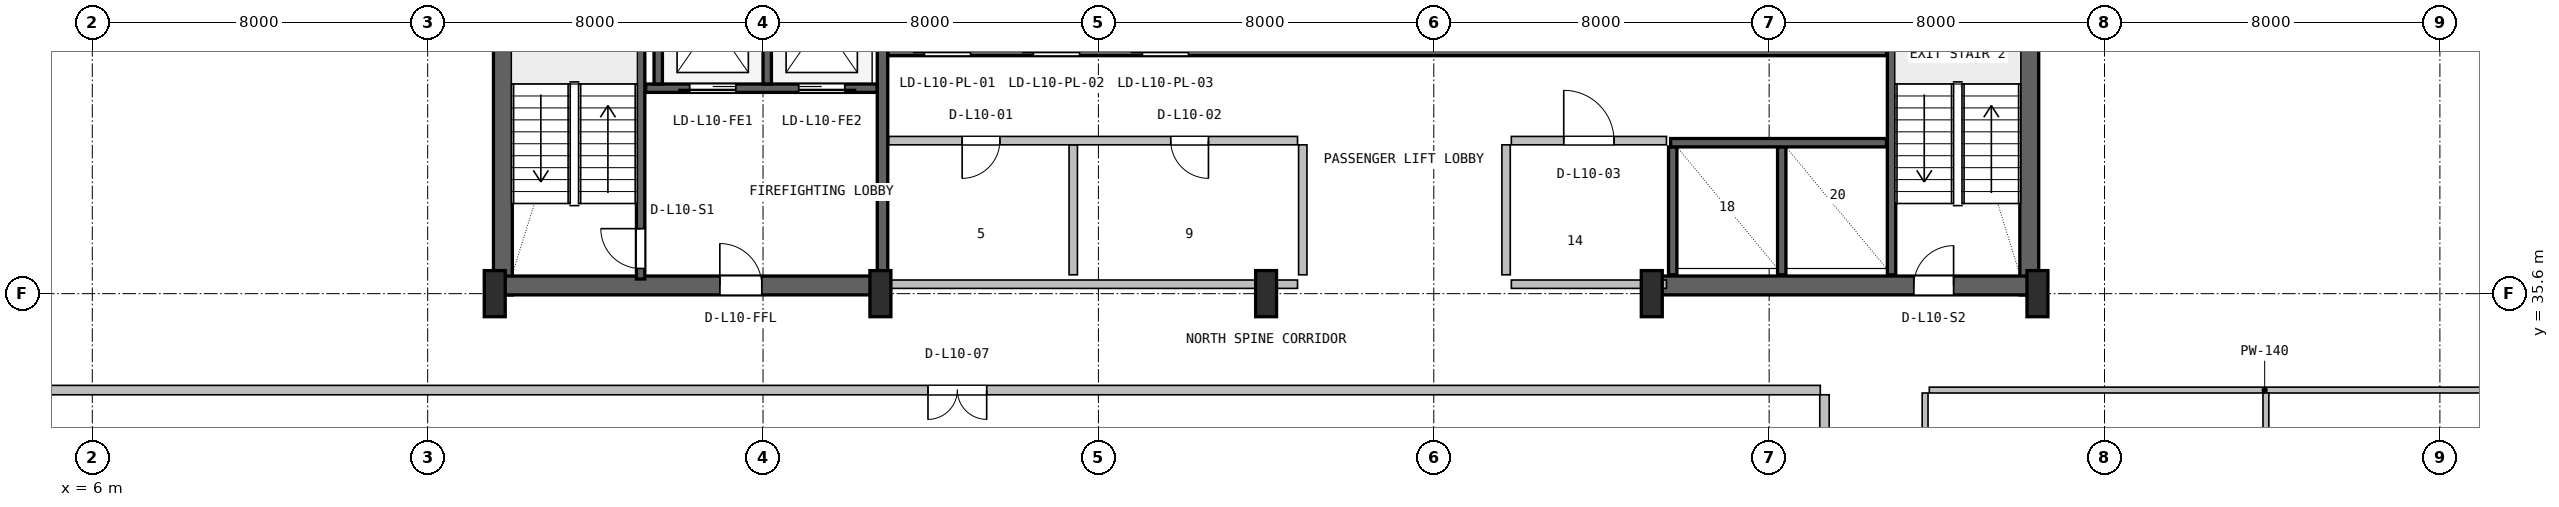
"""IFC4 building model, lengths in metres.
Left out: names, types, materials, properties, quantities, classifications, styles, units other than length and angle.
Written with IfcOpenShell. Run it as: python <this file> out.ifc"""

import sys

from ifc_helpers import new_model, si_unit, direction, frame, frame_2d, origin, origin_2d, place, context, subcontext, project, spatial, rectangle, i_section, extrude, source, transform, mapped, element, fill, save


model = new_model("IFC4")
c1 = context("Model", 3, precision=1e-05, world=origin(), true_north=direction((0.0, 1.0)))
c2 = subcontext(c1, "Body", "Model", "MODEL_VIEW")
j1 = project(units=[si_unit("LENGTHUNIT", "METRE"), si_unit("PLANEANGLEUNIT", "RADIAN")], contexts=[c1])
p1 = place(None, origin())
s1 = spatial("IfcSite", under=j1, at=p1, CompositionType="ELEMENT")
p2 = place(p1, origin())
s2 = spatial("IfcBuilding", under=s1, at=p2, CompositionType="ELEMENT")
p3 = place(p2, frame((0.0, 0.0, 47.1)))
s3 = spatial("IfcBuildingStorey", under=s2, at=p3, CompositionType="ELEMENT", Elevation=47.1)
for number, where, z_axis, x_axis in (
    (1, (15.795, 35.57, 0.0), (0.0, 0.0, 1.0), (0.0, 1.0, 0.0)),
    (2, (52.205, 35.57, 0.0), (0.0, 0.0, 1.0), (0.0, 1.0, 0.0)),
):
    element("IfcWall", number, at=place(p3, frame(where, z_axis=z_axis, x_axis=x_axis)), inside=s3, PredefinedType="SHEAR", context=c2, shape_type="SweptSolid", body=[
        extrude(rectangle(XDim=11.23, YDim=0.45, at=frame_2d((5.615, 0.0))), origin(), (0.0, 0.0, 1.0), 3.65),
    ])
p4 = place(p3, frame((15.57, 35.795, 0.0), z_axis=(0.0, 0.0, 1.0), x_axis=(1.0, 0.0, 0.0)))
e3 = element("IfcWall", 3, at=p4, inside=s3, PredefinedType="SHEAR", context=c2, shape_type="SweptSolid", body=[
    extrude(rectangle(XDim=9.23, YDim=0.45, at=frame_2d((4.615, 0.0))), origin(), (0.0, 0.0, 1.0), 3.65),
])
p5 = place(p4, frame((5.4, 0.0, 0.0)))
e4 = element("IfcOpeningElement", 4, at=p5, cuts=e3, PredefinedType="OPENING", context=c2, shape_type="SweptSolid", body=[
    extrude(rectangle(XDim=1.0, YDim=2.1, at=frame_2d((0.5, 1.05))), frame((0.0, 0.235, 0.0), z_axis=(0.0, -1.0, 0.0), x_axis=(1.0, 0.0, 0.0)), (0.0, 0.0, 1.0), 0.47),
])
p6 = place(p3, frame((43.2, 35.795, 0.0), z_axis=(0.0, 0.0, 1.0), x_axis=(1.0, 0.0, 0.0)))
e5 = element("IfcWall", 5, at=p6, inside=s3, PredefinedType="SHEAR", context=c2, shape_type="SweptSolid", body=[
    extrude(rectangle(XDim=9.23, YDim=0.45, at=frame_2d((4.615, 0.0))), origin(), (0.0, 0.0, 1.0), 3.65),
])
p7 = place(p6, frame((6.25, 0.0, 0.0)))
e6 = element("IfcOpeningElement", 6, at=p7, cuts=e5, PredefinedType="OPENING", context=c2, shape_type="SweptSolid", body=[
    extrude(rectangle(XDim=0.95, YDim=2.1, at=frame_2d((0.475, 1.05))), frame((0.0, 0.235, 0.0), z_axis=(0.0, -1.0, 0.0), x_axis=(1.0, 0.0, 0.0)), (0.0, 0.0, 1.0), 0.47),
])
m1 = source(origin(), c2, "Body", "SweptSolid", [
    extrude(i_section(OverallWidth=0.5, OverallDepth=1.1, WebThickness=0.018, FlangeThickness=0.032, FilletRadius=0.018, at=origin_2d()), origin(), (0.0, 0.0, 1.0), 3.9),
])
for number, where, z_axis, x_axis in (
    (7, (15.6, 35.6, 0.0), (0.0, 0.0, 1.0), (1.0, 0.0, 0.0)),
    (8, (24.8, 35.6, 0.0), (0.0, 0.0, 1.0), (1.0, 0.0, 0.0)),
    (9, (34.0, 35.6, 0.0), (0.0, 0.0, 1.0), (1.0, 0.0, 0.0)),
    (10, (43.2, 35.6, 0.0), (0.0, 0.0, 1.0), (1.0, 0.0, 0.0)),
    (11, (52.4, 35.6, 0.0), (0.0, 0.0, 1.0), (1.0, 0.0, 0.0)),
):
    element("IfcColumn", number, at=place(p3, frame(where, z_axis=z_axis, x_axis=x_axis)), inside=s3, PredefinedType="COLUMN", context=c2, shape_type="MappedRepresentation", body=[
        mapped(m1, transform((0.0, 0.0, 0.0), x_axis=(1.0, 0.0, 0.0), y_axis=(0.0, 1.0, 0.0), z_axis=(0.0, 0.0, 1.0), scale=1.0)),
    ])
p8 = place(p3, frame((19.08, 35.95, 0.0), z_axis=(0.0, 0.0, 1.0), x_axis=(0.0, 1.0, 0.0)))
e12 = element("IfcWall", 12, at=p8, inside=s3, PredefinedType="SHEAR", context=c2, shape_type="SweptSolid", body=[
    extrude(rectangle(XDim=9.65, YDim=0.2, at=frame_2d((4.825, 0.0))), origin(), (0.0, 0.0, 1.0), 3.65),
])
p9 = place(p8, frame((0.25, 0.0, 0.0)))
e13 = element("IfcOpeningElement", 13, at=p9, cuts=e12, PredefinedType="OPENING", context=c2, shape_type="SweptSolid", body=[
    extrude(rectangle(XDim=0.95, YDim=2.1, at=frame_2d((0.475, 1.05))), frame((0.0, 0.11, 0.0), z_axis=(0.0, -1.0, 0.0), x_axis=(1.0, 0.0, 0.0)), (0.0, 0.0, 1.0), 0.22),
])
p10 = place(p3, frame((24.85, 36.05, 0.0), z_axis=(0.0, 0.0, 1.0), x_axis=(0.0, 1.0, 0.0)))
e14 = element("IfcWall", 14, at=p10, inside=s3, PredefinedType="SHEAR", context=c2, shape_type="SweptSolid", body=[
    extrude(rectangle(XDim=10.45, YDim=0.25, at=frame_2d((5.225, 0.0))), origin(), (0.0, 0.0, 1.0), 3.65),
])
p11 = place(p3, frame((19.2, 40.5, 0.0), z_axis=(0.0, 0.0, 1.0), x_axis=(1.0, 0.0, 0.0)))
e15 = element("IfcWall", 15, at=p11, inside=s3, PredefinedType="SHEAR", context=c2, shape_type="SweptSolid", body=[
    extrude(rectangle(XDim=5.52, YDim=0.2, at=frame_2d((2.76, 0.0))), origin(), (0.0, 0.0, 1.0), 3.65),
])
p12 = place(p11, frame((1.05, 0.0, 0.0)))
e16 = element("IfcOpeningElement", 16, at=p12, cuts=e15, PredefinedType="OPENING", context=c2, shape_type="SweptSolid", body=[
    extrude(rectangle(XDim=1.1, YDim=2.18, at=frame_2d((0.55, 1.09))), frame((0.0, 0.11, 0.0), z_axis=(0.0, -1.0, 0.0), x_axis=(1.0, 0.0, 0.0)), (0.0, 0.0, 1.0), 0.22),
])
p13 = place(p11, frame((3.65, 0.0, 0.0)))
e17 = element("IfcOpeningElement", 17, at=p13, cuts=e15, PredefinedType="OPENING", context=c2, shape_type="SweptSolid", body=[
    extrude(rectangle(XDim=1.1, YDim=2.18, at=frame_2d((0.55, 1.09))), frame((0.0, 0.11, 0.0), z_axis=(0.0, -1.0, 0.0), x_axis=(1.0, 0.0, 0.0)), (0.0, 0.0, 1.0), 0.22),
])
p14 = place(p3, frame((22.1, 40.6, 0.0), z_axis=(0.0, 0.0, 1.0), x_axis=(0.0, 1.0, 0.0)))
e18 = element("IfcWall", 18, at=p14, inside=s3, PredefinedType="SHEAR", context=c2, shape_type="SweptSolid", body=[
    extrude(rectangle(XDim=3.0, YDim=0.2, at=frame_2d((1.5, 0.0))), origin(), (0.0, 0.0, 1.0), 3.65),
])
p15 = place(p3, frame((19.5, 40.6, 0.0), z_axis=(0.0, 0.0, 1.0), x_axis=(0.0, 1.0, 0.0)))
e19 = element("IfcWall", 19, at=p15, inside=s3, PredefinedType="SHEAR", context=c2, shape_type="SweptSolid", body=[
    extrude(rectangle(XDim=5.95, YDim=0.2, at=frame_2d((2.975, 0.0))), origin(), (0.0, 0.0, 1.0), 3.65),
])
p16 = place(p3, frame((48.92, 36.05, 0.0), z_axis=(0.0, 0.0, 1.0), x_axis=(0.0, 1.0, 0.0)))
e20 = element("IfcWall", 20, at=p16, inside=s3, PredefinedType="SHEAR", context=c2, shape_type="SweptSolid", body=[
    extrude(rectangle(XDim=10.5, YDim=0.2, at=frame_2d((5.25, 0.0))), origin(), (0.0, 0.0, 1.0), 3.65),
])
p17 = place(p3, frame((24.98, 41.4, 0.0), z_axis=(0.0, 0.0, 1.0), x_axis=(1.0, 0.0, 0.0)))
e21 = element("IfcWall", 21, at=p17, inside=s3, PredefinedType="SHEAR", context=c2, shape_type="SweptSolid", body=[
    extrude(rectangle(XDim=23.82, YDim=0.25, at=frame_2d((11.91, 0.0))), origin(), (0.0, 0.0, 1.0), 3.65),
])
p18 = place(p17, frame((0.87, 0.0, 0.0)))
e22 = element("IfcOpeningElement", 22, at=p18, cuts=e21, PredefinedType="OPENING", context=c2, shape_type="SweptSolid", body=[
    extrude(rectangle(XDim=1.1, YDim=2.18, at=frame_2d((0.55, 1.09))), frame((0.0, 0.135, 0.0), z_axis=(0.0, -1.0, 0.0), x_axis=(1.0, 0.0, 0.0)), (0.0, 0.0, 1.0), 0.27),
])
p19 = place(p17, frame((3.47, 0.0, 0.0)))
e23 = element("IfcOpeningElement", 23, at=p19, cuts=e21, PredefinedType="OPENING", context=c2, shape_type="SweptSolid", body=[
    extrude(rectangle(XDim=1.1, YDim=2.18, at=frame_2d((0.55, 1.09))), frame((0.0, 0.135, 0.0), z_axis=(0.0, -1.0, 0.0), x_axis=(1.0, 0.0, 0.0)), (0.0, 0.0, 1.0), 0.27),
])
p20 = place(p17, frame((6.07, 0.0, 0.0)))
e24 = element("IfcOpeningElement", 24, at=p20, cuts=e21, PredefinedType="OPENING", context=c2, shape_type="SweptSolid", body=[
    extrude(rectangle(XDim=1.1, YDim=2.18, at=frame_2d((0.55, 1.09))), frame((0.0, 0.135, 0.0), z_axis=(0.0, -1.0, 0.0), x_axis=(1.0, 0.0, 0.0)), (0.0, 0.0, 1.0), 0.27),
])
for number, where, z_axis, x_axis in (
    (25, (43.7, 36.05, 0.0), (0.0, 0.0, 1.0), (0.0, 1.0, 0.0)),
    (26, (46.3, 36.05, 0.0), (0.0, 0.0, 1.0), (0.0, 1.0, 0.0)),
):
    element("IfcWall", number, at=place(p3, frame(where, z_axis=z_axis, x_axis=x_axis)), inside=s3, PredefinedType="SHEAR", context=c2, shape_type="SweptSolid", body=[
        extrude(rectangle(XDim=3.05, YDim=0.2, at=frame_2d((1.525, 0.0))), origin(), (0.0, 0.0, 1.0), 3.65),
    ])
p21 = place(p3, frame((43.65, 39.2, 0.0), z_axis=(0.0, 0.0, 1.0), x_axis=(1.0, 0.0, 0.0)))
e27 = element("IfcWall", 27, at=p21, inside=s3, PredefinedType="SHEAR", context=c2, shape_type="SweptSolid", body=[
    extrude(rectangle(XDim=5.15, YDim=0.2, at=frame_2d((2.575, 0.0))), origin(), (0.0, 0.0, 1.0), 3.65),
])
p22 = place(p3, frame((25.0, 35.825, 0.0), z_axis=(0.0, 0.0, 1.0), x_axis=(1.0, 0.0, 0.0)))
e28 = element("IfcWall", 28, at=p22, inside=s3, PredefinedType="PLUMBINGWALL", context=c2, shape_type="SweptSolid", body=[
    extrude(rectangle(XDim=9.75, YDim=0.2, at=frame_2d((4.875, 0.0))), origin(), (0.0, 0.0, 1.0), 2.425),
])
p23 = place(p3, frame((29.4, 36.05, 0.0), z_axis=(0.0, 0.0, 1.0), x_axis=(0.0, 1.0, 0.0)))
e29 = element("IfcWall", 29, at=p23, inside=s3, PredefinedType="PLUMBINGWALL", context=c2, shape_type="SweptSolid", body=[
    extrude(rectangle(XDim=3.1, YDim=0.2, at=frame_2d((1.55, 0.0))), origin(), (0.0, 0.0, 1.0), 3.63),
])
p24 = place(p3, frame((25.0, 39.25, 0.0), z_axis=(0.0, 0.0, 1.0), x_axis=(1.0, 0.0, 0.0)))
e30 = element("IfcWall", 30, at=p24, inside=s3, PredefinedType="PLUMBINGWALL", context=c2, shape_type="SweptSolid", body=[
    extrude(rectangle(XDim=9.75, YDim=0.2, at=frame_2d((4.875, 0.0))), origin(), (0.0, 0.0, 1.0), 3.63),
])
p25 = place(p24, frame((1.75, 0.0, 0.0)))
e31 = element("IfcOpeningElement", 31, at=p25, cuts=e30, PredefinedType="OPENING", context=c2, shape_type="SweptSolid", body=[
    extrude(rectangle(XDim=0.9, YDim=2.06, at=frame_2d((0.45, 1.03))), frame((0.0, 0.11, 0.0), z_axis=(0.0, -1.0, 0.0), x_axis=(1.0, 0.0, 0.0)), (0.0, 0.0, 1.0), 0.22),
])
p26 = place(p24, frame((6.725, 0.0, 0.0)))
e32 = element("IfcOpeningElement", 32, at=p26, cuts=e30, PredefinedType="OPENING", context=c2, shape_type="SweptSolid", body=[
    extrude(rectangle(XDim=0.9, YDim=2.06, at=frame_2d((0.45, 1.03))), frame((0.0, 0.11, 0.0), z_axis=(0.0, -1.0, 0.0), x_axis=(1.0, 0.0, 0.0)), (0.0, 0.0, 1.0), 0.22),
])
p27 = place(p3, frame((34.875, 36.05, 0.0), z_axis=(0.0, 0.0, 1.0), x_axis=(0.0, 1.0, 0.0)))
e33 = element("IfcWall", 33, at=p27, inside=s3, PredefinedType="PLUMBINGWALL", context=c2, shape_type="SweptSolid", body=[
    extrude(rectangle(XDim=3.1, YDim=0.2, at=frame_2d((1.55, 0.0))), origin(), (0.0, 0.0, 1.0), 3.63),
])
p28 = place(p3, frame((39.85, 35.825, 0.0), z_axis=(0.0, 0.0, 1.0), x_axis=(1.0, 0.0, 0.0)))
e34 = element("IfcWall", 34, at=p28, inside=s3, PredefinedType="SOLIDWALL", context=c2, shape_type="SweptSolid", body=[
    extrude(rectangle(XDim=3.7, YDim=0.2, at=frame_2d((1.85, 0.0))), origin(), (0.0, 0.0, 1.0), 2.425),
])
p29 = place(p3, frame((39.85, 39.25, 0.0), z_axis=(0.0, 0.0, 1.0), x_axis=(1.0, 0.0, 0.0)))
e35 = element("IfcWall", 35, at=p29, inside=s3, PredefinedType="SOLIDWALL", context=c2, shape_type="SweptSolid", body=[
    extrude(rectangle(XDim=3.7, YDim=0.2, at=frame_2d((1.85, 0.0))), origin(), (0.0, 0.0, 1.0), 3.63),
])
p30 = place(p29, frame((1.25, 0.0, 0.0)))
e36 = element("IfcOpeningElement", 36, at=p30, cuts=e35, PredefinedType="OPENING", context=c2, shape_type="SweptSolid", body=[
    extrude(rectangle(XDim=1.2, YDim=2.1, at=frame_2d((0.6, 1.05))), frame((0.0, 0.11, 0.0), z_axis=(0.0, -1.0, 0.0), x_axis=(1.0, 0.0, 0.0)), (0.0, 0.0, 1.0), 0.22),
])
p31 = place(p3, frame((39.725, 36.05, 0.0), z_axis=(0.0, 0.0, 1.0), x_axis=(0.0, 1.0, 0.0)))
e37 = element("IfcWall", 37, at=p31, inside=s3, PredefinedType="SOLIDWALL", context=c2, shape_type="SweptSolid", body=[
    extrude(rectangle(XDim=3.1, YDim=0.2, at=frame_2d((1.55, 0.0))), origin(), (0.0, 0.0, 1.0), 3.63),
])
p32 = place(p3, frame((47.32, 13.203, 0.0), z_axis=(0.0, 0.0, 1.0), x_axis=(0.0, 1.0, 0.0)))
e38 = element("IfcWall", 38, at=p32, inside=s3, PredefinedType="PARTITIONING", context=c2, shape_type="SweptSolid", body=[
    extrude(rectangle(XDim=19.985, YDim=0.225, at=frame_2d((9.993, 0.0))), origin(), (0.0, 0.0, 1.0), 3.322),
])
p33 = place(p3, frame((2.18, 33.3, 0.0), z_axis=(0.0, 0.0, 1.0), x_axis=(1.0, 0.0, 0.0)))
e39 = element("IfcWall", 39, at=p33, inside=s3, PredefinedType="PARTITIONING", context=c2, shape_type="SweptSolid", body=[
    extrude(rectangle(XDim=45.04, YDim=0.225, at=frame_2d((22.52, 0.0))), origin(), (0.0, 0.0, 1.0), 2.852),
])
p34 = place(p33, frame((23.755, 0.0, 0.0)))
e40 = element("IfcOpeningElement", 40, at=p34, cuts=e39, PredefinedType="OPENING", context=c2, shape_type="SweptSolid", body=[
    extrude(rectangle(XDim=1.4, YDim=2.12, at=frame_2d((0.7, 1.06))), frame((0.0, 0.123, 0.0), z_axis=(0.0, -1.0, 0.0), x_axis=(1.0, 0.0, 0.0)), (0.0, 0.0, 1.0), 0.245),
])
p35 = place(p3, frame((49.82, 33.3, 0.0), z_axis=(0.0, 0.0, 1.0), x_axis=(1.0, 0.0, 0.0)))
e41 = element("IfcWall", 41, at=p35, inside=s3, PredefinedType="PARTITIONING", context=c2, shape_type="SweptSolid", body=[
    extrude(rectangle(XDim=16.0, YDim=0.14, at=frame_2d((8.0, 0.0))), origin(), (0.0, 0.0, 1.0), 3.208),
])
p36 = place(p3, frame((57.85, 12.2, 0.0), z_axis=(0.0, 0.0, 1.0), x_axis=(0.0, 1.0, 0.0)))
e42 = element("IfcWall", 42, at=p36, inside=s3, PredefinedType="PARTITIONING", context=c2, shape_type="SweptSolid", body=[
    extrude(rectangle(XDim=21.03, YDim=0.14, at=frame_2d((10.515, 0.0))), origin(), (0.0, 0.0, 1.0), 3.322),
])
p37 = place(p3, frame((49.72, 1.38, 0.0), z_axis=(0.0, 0.0, 1.0), x_axis=(0.0, 1.0, 0.0)))
e43 = element("IfcWall", 43, at=p37, inside=s3, PredefinedType="PARTITIONING", context=c2, shape_type="SweptSolid", body=[
    extrude(rectangle(XDim=31.85, YDim=0.14, at=frame_2d((15.925, 0.0))), origin(), (0.0, 0.0, 1.0), 3.208),
])
p38 = place(p37, frame((5.405, 0.0, 0.0)))
e44 = element("IfcOpeningElement", 44, at=p38, cuts=e43, PredefinedType="OPENING", context=c2, shape_type="SweptSolid", body=[
    extrude(rectangle(XDim=1.0, YDim=2.1, at=frame_2d((0.5, 1.05))), frame((0.0, 0.08, 0.0), z_axis=(0.0, -1.0, 0.0), x_axis=(1.0, 0.0, 0.0)), (0.0, 0.0, 1.0), 0.16),
])
p39 = place(p37, frame((20.685, 0.0, 0.0)))
e45 = element("IfcOpeningElement", 45, at=p39, cuts=e43, PredefinedType="OPENING", context=c2, shape_type="SweptSolid", body=[
    extrude(rectangle(XDim=1.4, YDim=2.12, at=frame_2d((0.7, 1.06))), frame((0.0, 0.08, 0.0), z_axis=(0.0, -1.0, 0.0), x_axis=(1.0, 0.0, 0.0)), (0.0, 0.0, 1.0), 0.16),
])
m2 = source(origin(), c2, "Body", "SweptSolid", [
    extrude(rectangle(XDim=0.95, YDim=2.1, at=frame_2d((0.475, 1.05))), frame((0.0, 0.025, 0.0), z_axis=(0.0, -1.0, 0.0), x_axis=(1.0, 0.0, 0.0)), (0.0, 0.0, 1.0), 0.05),
])
p40 = place(p9, origin())
e46 = element("IfcDoor", 46, at=p40, inside=s3, OperationType="SINGLE_SWING_RIGHT", PredefinedType="DOOR", context=c2, shape_type="MappedRepresentation", body=[
    mapped(m2, transform((0.0, 0.0, 0.0), x_axis=(1.0, 0.0, 0.0), y_axis=(0.0, 1.0, 0.0), z_axis=(0.0, 0.0, 1.0), scale=1.0)),
])
fill(e13, e46)
m3 = source(origin(), c2, "Body", "SweptSolid", [
    extrude(rectangle(XDim=1.0, YDim=2.1, at=frame_2d((0.5, 1.05))), frame((0.0, 0.025, 0.0), z_axis=(0.0, -1.0, 0.0), x_axis=(1.0, 0.0, 0.0)), (0.0, 0.0, 1.0), 0.05),
])
p41 = place(p5, origin())
e47 = element("IfcDoor", 47, at=p41, inside=s3, OperationType="SINGLE_SWING_LEFT", PredefinedType="DOOR", context=c2, shape_type="MappedRepresentation", body=[
    mapped(m3, transform((0.0, 0.0, 0.0), x_axis=(1.0, 0.0, 0.0), y_axis=(0.0, 1.0, 0.0), z_axis=(0.0, 0.0, 1.0), scale=1.0)),
])
fill(e4, e47)
m4 = source(origin(), c2, "Body", "SweptSolid", [
    extrude(rectangle(XDim=1.1, YDim=2.18, at=frame_2d((0.55, 1.09))), frame((0.0, 0.025, 0.0), z_axis=(0.0, -1.0, 0.0), x_axis=(1.0, 0.0, 0.0)), (0.0, 0.0, 1.0), 0.05),
])
p42 = place(p12, frame((1.1, 0.0, 0.0), z_axis=(0.0, 0.0, 1.0), x_axis=(-1.0, 0.0, 0.0)))
e48 = element("IfcDoor", 48, at=p42, inside=s3, OperationType="SLIDING_TO_LEFT", PredefinedType="DOOR", context=c2, shape_type="MappedRepresentation", body=[
    mapped(m4, transform((0.0, 0.0, 0.0), x_axis=(1.0, 0.0, 0.0), y_axis=(0.0, 1.0, 0.0), z_axis=(0.0, 0.0, 1.0), scale=1.0)),
])
fill(e16, e48)
p43 = place(p13, frame((1.1, 0.0, 0.0), z_axis=(0.0, 0.0, 1.0), x_axis=(-1.0, 0.0, 0.0)))
e49 = element("IfcDoor", 49, at=p43, inside=s3, OperationType="SLIDING_TO_RIGHT", PredefinedType="DOOR", context=c2, shape_type="MappedRepresentation", body=[
    mapped(m4, transform((0.0, 0.0, 0.0), x_axis=(1.0, 0.0, 0.0), y_axis=(0.0, 1.0, 0.0), z_axis=(0.0, 0.0, 1.0), scale=1.0)),
])
fill(e17, e49)
p44 = place(p7, origin())
e50 = element("IfcDoor", 50, at=p44, inside=s3, OperationType="SINGLE_SWING_RIGHT", PredefinedType="DOOR", context=c2, shape_type="MappedRepresentation", body=[
    mapped(m2, transform((0.0, 0.0, 0.0), x_axis=(1.0, 0.0, 0.0), y_axis=(0.0, 1.0, 0.0), z_axis=(0.0, 0.0, 1.0), scale=1.0)),
])
fill(e6, e50)
m5 = source(origin(), c2, "Body", "SweptSolid", [
    extrude(rectangle(XDim=0.9, YDim=2.06, at=frame_2d((0.45, 1.03))), frame((0.0, 0.025, 0.0), z_axis=(0.0, -1.0, 0.0), x_axis=(1.0, 0.0, 0.0)), (0.0, 0.0, 1.0), 0.05),
])
p45 = place(p25, frame((0.9, 0.0, 0.0), z_axis=(0.0, 0.0, 1.0), x_axis=(-1.0, 0.0, 0.0)))
e51 = element("IfcDoor", 51, at=p45, inside=s3, OperationType="SINGLE_SWING_LEFT", PredefinedType="DOOR", context=c2, shape_type="MappedRepresentation", body=[
    mapped(m5, transform((0.0, 0.0, 0.0), x_axis=(1.0, 0.0, 0.0), y_axis=(0.0, 1.0, 0.0), z_axis=(0.0, 0.0, 1.0), scale=1.0)),
])
fill(e31, e51)
p46 = place(p26, frame((0.9, 0.0, 0.0), z_axis=(0.0, 0.0, 1.0), x_axis=(-1.0, 0.0, 0.0)))
e52 = element("IfcDoor", 52, at=p46, inside=s3, OperationType="SINGLE_SWING_RIGHT", PredefinedType="DOOR", context=c2, shape_type="MappedRepresentation", body=[
    mapped(m5, transform((0.0, 0.0, 0.0), x_axis=(1.0, 0.0, 0.0), y_axis=(0.0, 1.0, 0.0), z_axis=(0.0, 0.0, 1.0), scale=1.0)),
])
fill(e32, e52)
m6 = source(origin(), c2, "Body", "SweptSolid", [
    extrude(rectangle(XDim=1.2, YDim=2.1, at=frame_2d((0.6, 1.05))), frame((0.0, 0.025, 0.0), z_axis=(0.0, -1.0, 0.0), x_axis=(1.0, 0.0, 0.0)), (0.0, 0.0, 1.0), 0.05),
])
p47 = place(p30, origin())
e53 = element("IfcDoor", 53, at=p47, inside=s3, OperationType="SINGLE_SWING_LEFT", PredefinedType="DOOR", context=c2, shape_type="MappedRepresentation", body=[
    mapped(m6, transform((0.0, 0.0, 0.0), x_axis=(1.0, 0.0, 0.0), y_axis=(0.0, 1.0, 0.0), z_axis=(0.0, 0.0, 1.0), scale=1.0)),
])
fill(e36, e53)
m7 = source(origin(), c2, "Body", "SweptSolid", [
    extrude(rectangle(XDim=1.4, YDim=2.12, at=frame_2d((0.7, 1.06))), frame((0.0, 0.025, 0.0), z_axis=(0.0, -1.0, 0.0), x_axis=(1.0, 0.0, 0.0)), (0.0, 0.0, 1.0), 0.05),
])
p48 = place(p34, frame((1.4, 0.0, 0.0), z_axis=(0.0, 0.0, 1.0), x_axis=(-1.0, 0.0, 0.0)))
e54 = element("IfcDoor", 54, at=p48, inside=s3, OperationType="DOUBLE_DOOR_SINGLE_SWING", PredefinedType="DOOR", context=c2, shape_type="MappedRepresentation", body=[
    mapped(m7, transform((0.0, 0.0, 0.0), x_axis=(1.0, 0.0, 0.0), y_axis=(0.0, 1.0, 0.0), z_axis=(0.0, 0.0, 1.0), scale=1.0)),
])
fill(e40, e54)
save(model, sys.argv[1])
